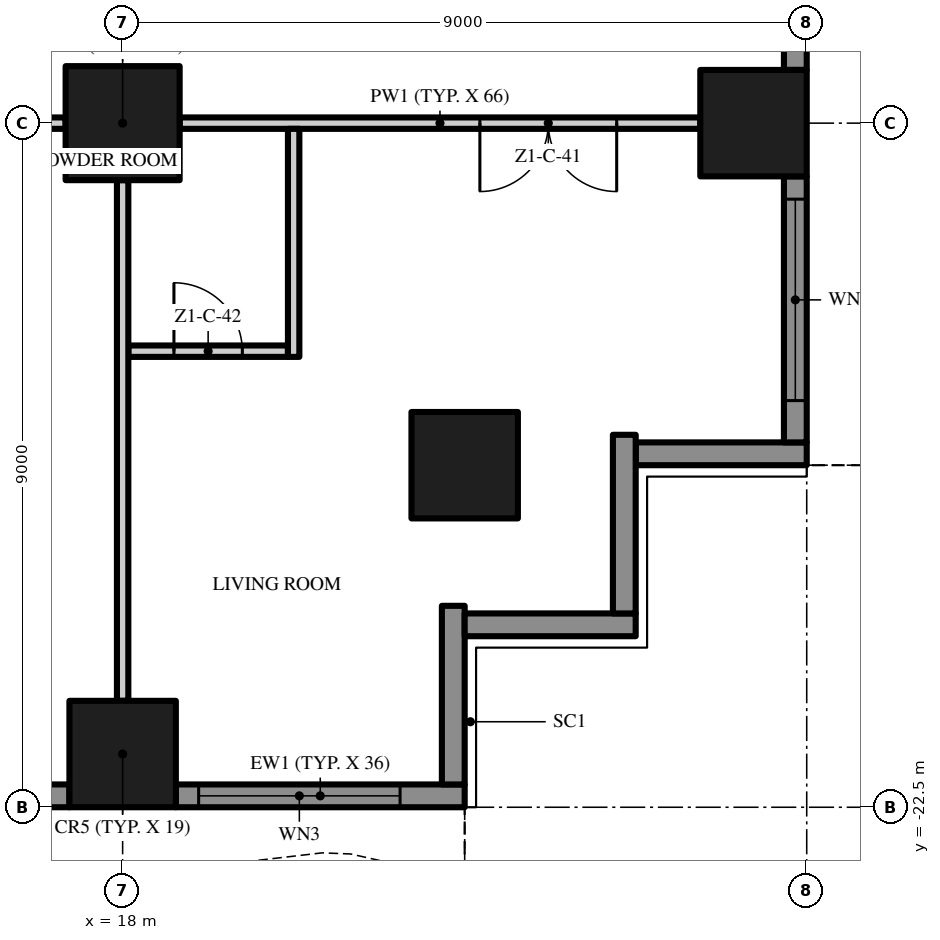
"""IFC4 building model, lengths in metres.
Left out: names, types, materials, properties, quantities, classifications, styles, units other than length and angle.
Written with IfcOpenShell. Run it as: python <this file> out.ifc"""

import sys

from ifc_helpers import new_model, si_unit, direction, frame, frame_2d, origin, origin_2d, place, context, subcontext, project, spatial, polyline, rectangle, outline, extrude, element, fill, save


model = new_model("IFC4")
c1 = context("Model", 3, precision=1e-05, world=origin(), true_north=direction((0.0, 1.0)))
c2 = subcontext(c1, "Body", "Model", "MODEL_VIEW")
j1 = project(units=[si_unit("LENGTHUNIT", "METRE"), si_unit("PLANEANGLEUNIT", "RADIAN")], contexts=[c1])
p1 = place(None, origin())
s1 = spatial("IfcSite", under=j1, at=p1, CompositionType="ELEMENT")
p2 = place(p1, origin())
s2 = spatial("IfcBuilding", under=s1, at=p2, CompositionType="ELEMENT")
p3 = place(p2, frame((0.0, 0.0, 41.6)))
s3 = spatial("IfcBuildingStorey", under=s2, at=p3, CompositionType="ELEMENT", Elevation=41.6)
p4 = place(p3, frame((18.0, -13.5, 0.0), z_axis=(0.0, 0.0, 1.0), x_axis=(1.0, 0.0, 0.0)))
e1 = element("IfcColumn", 1, at=p4, inside=s3, PredefinedType="COLUMN", context=c2, shape_type="SweptSolid", body=[
    extrude(rectangle(XDim=1.5, YDim=1.5, at=origin_2d()), origin(), (0.0, 0.0, 1.0), 3.5),
])
for number, where, z_axis, x_axis in (
    (2, (18.0, -21.8, 0.0), (0.0, 0.0, 1.0), (1.0, 0.0, 0.0)),
    (3, (26.3, -13.5, 0.0), (0.0, 0.0, 1.0), (1.0, 0.0, 0.0)),
    (4, (22.5, -18.0, 0.0), (0.0, 0.0, 1.0), (1.0, 0.0, 0.0)),
):
    element("IfcColumn", number, at=place(p3, frame(where, z_axis=z_axis, x_axis=x_axis)), inside=s3, PredefinedType="COLUMN", context=c2, shape_type="SweptSolid", body=[
        extrude(rectangle(XDim=1.4, YDim=1.4, at=origin_2d()), origin(), (0.0, 0.0, 1.0), 3.5),
    ])
p5 = place(p3, frame((17.3, -22.35, 0.0), z_axis=(0.0, 0.0, 1.0), x_axis=(-1.0, 0.0, 0.0)))
e5 = element("IfcWall", 5, at=p5, inside=s3, PredefinedType="SOLIDWALL", context=c2, shape_type="SweptSolid", body=[
    extrude(rectangle(XDim=7.6, YDim=0.3, at=frame_2d((3.8, 0.0))), origin(), (0.0, 0.0, 1.0), 3.5),
])
p6 = place(p5, frame((4.65, 0.0, 0.0)))
e6 = element("IfcOpeningElement", 6, at=p6, cuts=e5, PredefinedType="OPENING", context=c2, shape_type="SweptSolid", body=[
    extrude(rectangle(XDim=2.65, YDim=2.4, at=frame_2d((1.325, 1.2))), frame((0.0, 0.16, 0.0), z_axis=(0.0, -1.0, 0.0), x_axis=(1.0, 0.0, 0.0)), (0.0, 0.0, 1.0), 0.32),
])
p7 = place(p5, frame((0.3, 0.0, 0.0)))
e7 = element("IfcOpeningElement", 7, at=p7, cuts=e5, PredefinedType="OPENING", context=c2, shape_type="SweptSolid", body=[
    extrude(rectangle(XDim=2.65, YDim=2.4, at=frame_2d((1.325, 1.2))), frame((0.0, 0.16, 0.0), z_axis=(0.0, -1.0, 0.0), x_axis=(1.0, 0.0, 0.0)), (0.0, 0.0, 1.0), 0.32),
])
p8 = place(p3, frame((22.5, -22.35, 0.0), z_axis=(0.0, 0.0, 1.0), x_axis=(-1.0, 0.0, 0.0)))
e8 = element("IfcWall", 8, at=p8, inside=s3, PredefinedType="SOLIDWALL", context=c2, shape_type="SweptSolid", body=[
    extrude(rectangle(XDim=3.8, YDim=0.3, at=frame_2d((1.9, 0.0))), origin(), (0.0, 0.0, 1.0), 3.5),
])
p9 = place(p8, frame((0.85, 0.0, 0.45)))
e9 = element("IfcOpeningElement", 9, at=p9, cuts=e8, PredefinedType="OPENING", context=c2, shape_type="SweptSolid", body=[
    extrude(rectangle(XDim=2.65, YDim=2.65, at=frame_2d((1.325, 1.325))), frame((0.0, 0.16, 0.0), z_axis=(0.0, -1.0, 0.0), x_axis=(1.0, 0.0, 0.0)), (0.0, 0.0, 1.0), 0.32),
])
p10 = place(p3, frame((22.35, -19.85, 0.0), z_axis=(0.0, 0.0, 1.0), x_axis=(0.0, -1.0, 0.0)))
e10 = element("IfcWall", 10, at=p10, inside=s3, PredefinedType="SOLIDWALL", context=c2, shape_type="SweptSolid", body=[
    extrude(rectangle(XDim=2.35, YDim=0.3, at=frame_2d((1.175, 0.0))), origin(), (0.0, 0.0, 1.0), 3.5),
])
p11 = place(p3, frame((24.75, -20.1, 0.0), z_axis=(0.0, 0.0, 1.0), x_axis=(-1.0, 0.0, 0.0)))
e11 = element("IfcWall", 11, at=p11, inside=s3, PredefinedType="SOLIDWALL", context=c2, shape_type="SweptSolid", body=[
    extrude(rectangle(XDim=2.25, YDim=0.3, at=frame_2d((1.125, 0.0))), origin(), (0.0, 0.0, 1.0), 3.5),
])
p12 = place(p3, frame((24.6, -17.6, 0.0), z_axis=(0.0, 0.0, 1.0), x_axis=(0.0, -1.0, 0.0)))
e12 = element("IfcWall", 12, at=p12, inside=s3, PredefinedType="SOLIDWALL", context=c2, shape_type="SweptSolid", body=[
    extrude(rectangle(XDim=2.35, YDim=0.3, at=frame_2d((1.175, 0.0))), origin(), (0.0, 0.0, 1.0), 3.5),
])
p13 = place(p3, frame((27.0, -17.85, 0.0), z_axis=(0.0, 0.0, 1.0), x_axis=(-1.0, 0.0, 0.0)))
e13 = element("IfcWall", 13, at=p13, inside=s3, PredefinedType="SOLIDWALL", context=c2, shape_type="SweptSolid", body=[
    extrude(rectangle(XDim=2.25, YDim=0.3, at=frame_2d((1.125, 0.0))), origin(), (0.0, 0.0, 1.0), 3.5),
])
p14 = place(p3, frame((26.85, -14.2, 0.0), z_axis=(0.0, 0.0, 1.0), x_axis=(0.0, -1.0, 0.0)))
e14 = element("IfcWall", 14, at=p14, inside=s3, PredefinedType="SOLIDWALL", context=c2, shape_type="SweptSolid", body=[
    extrude(rectangle(XDim=3.5, YDim=0.3, at=frame_2d((1.75, 0.0))), origin(), (0.0, 0.0, 1.0), 3.5),
])
p15 = place(p14, frame((0.3, 0.0, 0.45)))
e15 = element("IfcOpeningElement", 15, at=p15, cuts=e14, PredefinedType="OPENING", context=c2, shape_type="SweptSolid", body=[
    extrude(rectangle(XDim=2.65, YDim=2.65, at=frame_2d((1.325, 1.325))), frame((0.0, 0.16, 0.0), z_axis=(0.0, -1.0, 0.0), x_axis=(1.0, 0.0, 0.0)), (0.0, 0.0, 1.0), 0.32),
])
p16 = place(p3, frame((26.85, -5.2, 0.0), z_axis=(0.0, 0.0, 1.0), x_axis=(0.0, -1.0, 0.0)))
e16 = element("IfcWall", 16, at=p16, inside=s3, PredefinedType="SOLIDWALL", context=c2, shape_type="SweptSolid", body=[
    extrude(rectangle(XDim=7.6, YDim=0.3, at=frame_2d((3.8, 0.0))), origin(), (0.0, 0.0, 1.0), 3.5),
])
p17 = place(p16, frame((4.65, 0.0, 0.0)))
e17 = element("IfcOpeningElement", 17, at=p17, cuts=e16, PredefinedType="OPENING", context=c2, shape_type="SweptSolid", body=[
    extrude(rectangle(XDim=2.65, YDim=2.4, at=frame_2d((1.325, 1.2))), frame((0.0, 0.16, 0.0), z_axis=(0.0, -1.0, 0.0), x_axis=(1.0, 0.0, 0.0)), (0.0, 0.0, 1.0), 0.32),
])
p18 = place(p16, frame((0.3, 0.0, 0.45)))
e18 = element("IfcOpeningElement", 18, at=p18, cuts=e16, PredefinedType="OPENING", context=c2, shape_type="SweptSolid", body=[
    extrude(rectangle(XDim=2.65, YDim=2.65, at=frame_2d((1.325, 1.325))), frame((0.0, 0.16, 0.0), z_axis=(0.0, -1.0, 0.0), x_axis=(1.0, 0.0, 0.0)), (0.0, 0.0, 1.0), 0.32),
])
p19 = place(p3, origin())
e19 = element("IfcWall", 19, at=p19, inside=s3, PredefinedType="USERDEFINED", context=c2, shape_type="SweptSolid", body=[
    extrude(outline(polyline([(-22.5, -23.451), (-21.0, -24.112), (-19.5, -24.845), (-18.0, -25.369), (-16.875, -25.5), (-16.5, -25.485), (-15.0, -25.149), (-13.5, -24.488), (-12.0, -23.755), (-10.5, -23.231), (-9.375, -23.1), (-9.0, -23.115), (-7.5, -23.451), (-6.0, -24.112), (-4.5, -24.845), (-3.0, -25.369), (-1.875, -25.5), (-1.5, -25.485), (0.0, -25.149), (1.5, -24.488), (3.0, -23.755), (4.5, -23.231), (5.625, -23.1), (6.0, -23.115), (7.5, -23.451), (9.0, -24.112), (10.5, -24.845), (12.0, -25.369), (13.125, -25.5), (13.5, -25.485), (15.0, -25.149), (16.5, -24.488), (18.0, -23.755), (19.5, -23.231), (20.625, -23.1), (21.0, -23.115), (22.5, -23.451), (22.555, -23.208), (21.033, -22.866), (20.615, -22.849), (19.444, -22.986), (17.904, -23.524), (16.395, -24.261), (14.921, -24.91), (13.467, -25.236), (13.135, -25.249), (12.056, -25.124), (10.596, -24.614), (9.105, -23.885), (7.579, -23.213), (6.033, -22.866), (5.615, -22.849), (4.444, -22.986), (2.904, -23.524), (1.395, -24.261), (-0.079, -24.91), (-1.533, -25.236), (-1.865, -25.249), (-2.944, -25.124), (-4.404, -24.614), (-5.895, -23.885), (-7.421, -23.213), (-8.967, -22.866), (-9.385, -22.849), (-10.556, -22.986), (-12.096, -23.524), (-13.605, -24.261), (-15.079, -24.91), (-16.533, -25.236), (-16.865, -25.249), (-17.944, -25.124), (-19.404, -24.614), (-20.895, -23.885), (-22.399, -23.223), (-22.5, -23.451)])), origin(), (0.0, 0.0, 1.0), 0.9),
])
p20 = place(p3, origin())
e20 = element("IfcWall", 20, at=p20, inside=s3, PredefinedType="USERDEFINED", context=c2, shape_type="SweptSolid", body=[
    extrude(outline(polyline([(27.951, -18.0), (28.612, -16.5), (29.345, -15.0), (29.869, -13.5), (30.0, -12.375), (29.985, -12.0), (29.649, -10.5), (28.988, -9.0), (28.255, -7.5), (27.731, -6.0), (27.6, -4.875), (27.615, -4.5), (27.951, -3.0), (28.612, -1.5), (29.345, 0.0), (29.869, 1.5), (30.0, 2.625), (29.985, 3.0), (29.649, 4.5), (28.988, 6.0), (28.255, 7.5), (27.731, 9.0), (27.6, 10.125), (27.615, 10.5), (27.951, 12.0), (28.612, 13.5), (29.345, 15.0), (29.869, 16.5), (30.0, 17.625), (29.985, 18.0), (29.735, 17.99), (29.749, 17.635), (29.624, 16.556), (29.114, 15.096), (28.385, 13.605), (27.713, 12.079), (27.366, 10.533), (27.349, 10.115), (27.486, 8.944), (28.024, 7.404), (28.761, 5.895), (29.41, 4.421), (29.736, 2.967), (29.749, 2.635), (29.624, 1.556), (29.114, 0.096), (28.385, -1.395), (27.713, -2.921), (27.366, -4.467), (27.349, -4.885), (27.486, -6.056), (28.024, -7.596), (28.761, -9.105), (29.41, -10.579), (29.736, -12.033), (29.749, -12.365), (29.624, -13.444), (29.114, -14.904), (28.385, -16.395), (27.723, -17.899), (27.951, -18.0)])), origin(), (0.0, 0.0, 1.0), 0.9),
])
p21 = place(p3, frame((18.075, -16.5, 0.0), z_axis=(0.0, 0.0, 1.0), x_axis=(1.0, 0.0, 0.0)))
e21 = element("IfcWall", 21, at=p21, inside=s3, PredefinedType="PARTITIONING", context=c2, shape_type="SweptSolid", body=[
    extrude(rectangle(XDim=2.1, YDim=0.15, at=frame_2d((1.05, 0.0))), origin(), (0.0, 0.0, 1.0), 3.5),
])
p22 = place(p21, frame((0.6, 0.0, 0.0)))
e22 = element("IfcOpeningElement", 22, at=p22, cuts=e21, PredefinedType="OPENING", context=c2, shape_type="SweptSolid", body=[
    extrude(rectangle(XDim=0.9, YDim=2.1, at=frame_2d((0.45, 1.05))), frame((0.0, 0.085, 0.0), z_axis=(0.0, -1.0, 0.0), x_axis=(1.0, 0.0, 0.0)), (0.0, 0.0, 1.0), 0.17),
])
p23 = place(p3, frame((17.25, -13.5, 0.0), z_axis=(0.0, 0.0, 1.0), x_axis=(-1.0, 0.0, 0.0)))
e23 = element("IfcWall", 23, at=p23, inside=s3, PredefinedType="PARTITIONING", context=c2, shape_type="SweptSolid", body=[
    extrude(rectangle(XDim=7.5, YDim=0.15, at=frame_2d((3.75, 0.0))), origin(), (0.0, 0.0, 1.0), 3.5),
])
p24 = place(p23, frame((5.25, 0.0, 0.0)))
e24 = element("IfcOpeningElement", 24, at=p24, cuts=e23, PredefinedType="OPENING", context=c2, shape_type="SweptSolid", body=[
    extrude(rectangle(XDim=1.5, YDim=2.4, at=frame_2d((0.75, 1.2))), frame((0.0, 0.085, 0.0), z_axis=(0.0, -1.0, 0.0), x_axis=(1.0, 0.0, 0.0)), (0.0, 0.0, 1.0), 0.17),
])
p25 = place(p3, frame((25.6, -13.5, 0.0), z_axis=(0.0, 0.0, 1.0), x_axis=(-1.0, 0.0, 0.0)))
e25 = element("IfcWall", 25, at=p25, inside=s3, PredefinedType="PARTITIONING", context=c2, shape_type="SweptSolid", body=[
    extrude(rectangle(XDim=6.85, YDim=0.15, at=frame_2d((3.425, 0.0))), origin(), (0.0, 0.0, 1.0), 3.5),
])
p26 = place(p25, frame((1.1, 0.0, 0.0)))
e26 = element("IfcOpeningElement", 26, at=p26, cuts=e25, PredefinedType="OPENING", context=c2, shape_type="SweptSolid", body=[
    extrude(rectangle(XDim=1.8, YDim=2.4, at=frame_2d((0.9, 1.2))), frame((0.0, 0.085, 0.0), z_axis=(0.0, -1.0, 0.0), x_axis=(1.0, 0.0, 0.0)), (0.0, 0.0, 1.0), 0.17),
])
p27 = place(p3, frame((18.0, -21.1, 0.0), z_axis=(0.0, 0.0, 1.0), x_axis=(0.0, 1.0, 0.0)))
e27 = element("IfcWall", 27, at=p27, inside=s3, PredefinedType="PARTITIONING", context=c2, shape_type="SweptSolid", body=[
    extrude(rectangle(XDim=6.85, YDim=0.15, at=frame_2d((3.425, 0.0))), origin(), (0.0, 0.0, 1.0), 3.5),
])
p28 = place(p3, frame((20.25, -16.575, 0.0), z_axis=(0.0, 0.0, 1.0), x_axis=(0.0, 1.0, 0.0)))
e28 = element("IfcWall", 28, at=p28, inside=s3, PredefinedType="PARTITIONING", context=c2, shape_type="SweptSolid", body=[
    extrude(rectangle(XDim=3.0, YDim=0.15, at=frame_2d((1.5, 0.0))), origin(), (0.0, 0.0, 1.0), 3.5),
])
p29 = place(p9, origin())
e29 = element("IfcWindow", 29, at=p29, inside=s3, PartitioningType="SINGLE_PANEL", PredefinedType="WINDOW", context=c2, shape_type="SweptSolid", body=[
    extrude(rectangle(XDim=2.65, YDim=2.65, at=frame_2d((1.325, 1.325))), frame((0.0, 0.03, 0.0), z_axis=(0.0, -1.0, 0.0), x_axis=(1.0, 0.0, 0.0)), (0.0, 0.0, 1.0), 0.06),
])
fill(e9, e29)
p30 = place(p15, origin())
e30 = element("IfcWindow", 30, at=p30, inside=s3, PartitioningType="SINGLE_PANEL", PredefinedType="WINDOW", context=c2, shape_type="SweptSolid", body=[
    extrude(rectangle(XDim=2.65, YDim=2.65, at=frame_2d((1.325, 1.325))), frame((0.0, 0.03, 0.0), z_axis=(0.0, -1.0, 0.0), x_axis=(1.0, 0.0, 0.0)), (0.0, 0.0, 1.0), 0.06),
])
fill(e15, e30)
p31 = place(p26, origin())
e31 = element("IfcDoor", 31, at=p31, inside=s3, OperationType="DOUBLE_DOOR_SINGLE_SWING", PredefinedType="DOOR", context=c2, shape_type="SweptSolid", body=[
    extrude(rectangle(XDim=1.8, YDim=2.4, at=frame_2d((0.9, 1.2))), frame((0.0, 0.025, 0.0), z_axis=(0.0, -1.0, 0.0), x_axis=(1.0, 0.0, 0.0)), (0.0, 0.0, 1.0), 0.05),
])
fill(e26, e31)
p32 = place(p22, origin())
e32 = element("IfcDoor", 32, at=p32, inside=s3, OperationType="SINGLE_SWING_LEFT", PredefinedType="DOOR", context=c2, shape_type="SweptSolid", body=[
    extrude(rectangle(XDim=0.9, YDim=2.1, at=frame_2d((0.45, 1.05))), frame((0.0, 0.025, 0.0), z_axis=(0.0, -1.0, 0.0), x_axis=(1.0, 0.0, 0.0)), (0.0, 0.0, 1.0), 0.05),
])
fill(e22, e32)
save(model, sys.argv[1])
